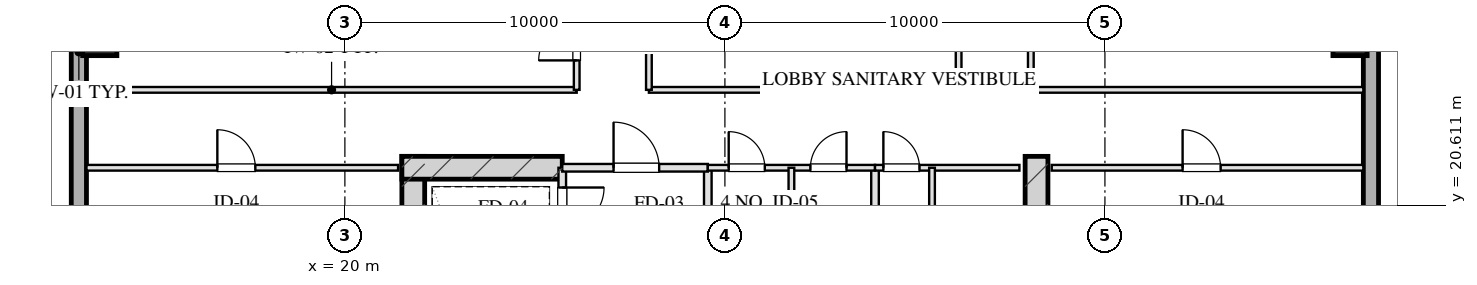
"""IFC4 building model, lengths in metres.
Left out: names, types, materials, properties, quantities, classifications, styles, units other than length and angle.
Written with IfcOpenShell. Run it as: python <this file> out.ifc"""

import sys

from ifc_helpers import new_model, si_unit, direction, frame, frame_2d, origin, origin_2d, place, context, subcontext, project, spatial, rectangle, hollow_rectangle, extrude, element, fill, save


model = new_model("IFC4")
c1 = context("Model", 3, precision=1e-05, world=origin(), true_north=direction((0.0, 1.0)))
c2 = subcontext(c1, "Body", "Model", "MODEL_VIEW")
j1 = project(units=[si_unit("LENGTHUNIT", "METRE"), si_unit("PLANEANGLEUNIT", "RADIAN")], contexts=[c1])
p1 = place(None, origin())
s1 = spatial("IfcSite", under=j1, at=p1, CompositionType="ELEMENT")
p2 = place(p1, origin())
s2 = spatial("IfcBuilding", under=s1, at=p2, CompositionType="ELEMENT")
p3 = place(p2, frame((0.0, 0.0, 177.1)))
s3 = spatial("IfcBuildingStorey", under=s2, at=p3, CompositionType="ELEMENT", Elevation=177.1)
for number, where, z_axis, x_axis in (
    (1, (21.8, 21.9, 0.0), (0.0, 0.0, 1.0), (0.0, -1.0, 0.0)),
    (2, (38.2, 21.9, 0.0), (0.0, 0.0, 1.0), (0.0, -1.0, 0.0)),
):
    element("IfcWall", number, at=place(p3, frame(where, z_axis=z_axis, x_axis=x_axis)), inside=s3, PredefinedType="SHEAR", context=c2, shape_type="SweptSolid", body=[
        extrude(rectangle(XDim=9.48, YDim=0.6, at=frame_2d((4.74, 0.0))), origin(), (0.0, 0.0, 1.0), 3.45),
    ])
p4 = place(p3, frame((21.5, 21.6, 0.0), z_axis=(0.0, 0.0, 1.0), x_axis=(1.0, 0.0, 0.0)))
e3 = element("IfcWall", 3, at=p4, inside=s3, PredefinedType="SHEAR", context=c2, shape_type="SweptSolid", body=[
    extrude(rectangle(XDim=4.22, YDim=0.6, at=frame_2d((2.11, 0.0))), origin(), (0.0, 0.0, 1.0), 3.45),
])
for number, where, z_axis, x_axis in (
    (4, (13.55, 25.0, 0.0), (0.0, 0.0, 1.0), (1.0, 0.0, 0.0)),
    (5, (46.45, 25.0, 0.0), (0.0, 0.0, 1.0), (1.0, 0.0, 0.0)),
):
    element("IfcColumn", number, at=place(p3, frame(where, z_axis=z_axis, x_axis=x_axis)), inside=s3, PredefinedType="COLUMN", context=c2, shape_type="SweptSolid", body=[
        extrude(hollow_rectangle(XDim=0.9, YDim=0.9, WallThickness=0.032, at=origin_2d()), origin(), (0.0, 0.0, 1.0), 3.451),
    ])
p5 = place(p3, frame((13.0, 10.8, 0.0), z_axis=(0.0, 0.0, 1.0), x_axis=(0.0, 1.0, 0.0)))
e6 = element("IfcWall", 6, at=p5, inside=s3, PredefinedType="SOLIDWALL", context=c2, shape_type="SweptSolid", body=[
    extrude(rectangle(XDim=46.4, YDim=0.4, at=frame_2d((23.2, 0.0))), origin(), (0.0, 0.0, 1.0), 2.61),
])
p6 = place(p5, frame((15.75, 0.0, 0.75)))
e7 = element("IfcOpeningElement", 7, at=p6, cuts=e6, PredefinedType="OPENING", context=c2, shape_type="SweptSolid", body=[
    extrude(rectangle(XDim=2.1, YDim=1.46, at=frame_2d((1.05, 0.73))), frame((0.0, 0.21, 0.0), z_axis=(0.0, -1.0, 0.0), x_axis=(1.0, 0.0, 0.0)), (0.0, 0.0, 1.0), 0.42),
])
p7 = place(p5, frame((19.55, 0.0, 0.75)))
e8 = element("IfcOpeningElement", 8, at=p7, cuts=e6, PredefinedType="OPENING", context=c2, shape_type="SweptSolid", body=[
    extrude(rectangle(XDim=2.1, YDim=1.46, at=frame_2d((1.05, 0.73))), frame((0.0, 0.21, 0.0), z_axis=(0.0, -1.0, 0.0), x_axis=(1.0, 0.0, 0.0)), (0.0, 0.0, 1.0), 0.42),
])
p8 = place(p5, frame((28.45, 0.0, 0.0)))
e9 = element("IfcOpeningElement", 9, at=p8, cuts=e6, PredefinedType="OPENING", context=c2, shape_type="SweptSolid", body=[
    extrude(rectangle(XDim=1.1, YDim=2.15, at=frame_2d((0.55, 1.075))), frame((0.0, 0.21, 0.0), z_axis=(0.0, -1.0, 0.0), x_axis=(1.0, 0.0, 0.0)), (0.0, 0.0, 1.0), 0.42),
])
p9 = place(p3, frame((47.0, 57.2, 0.0), z_axis=(0.0, 0.0, 1.0), x_axis=(0.0, -1.0, 0.0)))
e10 = element("IfcWall", 10, at=p9, inside=s3, PredefinedType="SOLIDWALL", context=c2, shape_type="SweptSolid", body=[
    extrude(rectangle(XDim=46.4, YDim=0.4, at=frame_2d((23.2, 0.0))), origin(), (0.0, 0.0, 1.0), 2.61),
])
p10 = place(p9, frame((28.55, 0.0, 0.75)))
e11 = element("IfcOpeningElement", 11, at=p10, cuts=e10, PredefinedType="OPENING", context=c2, shape_type="SweptSolid", body=[
    extrude(rectangle(XDim=2.1, YDim=1.46, at=frame_2d((1.05, 0.73))), frame((0.0, 0.21, 0.0), z_axis=(0.0, -1.0, 0.0), x_axis=(1.0, 0.0, 0.0)), (0.0, 0.0, 1.0), 0.42),
])
p11 = place(p9, frame((24.75, 0.0, 0.75)))
e12 = element("IfcOpeningElement", 12, at=p11, cuts=e10, PredefinedType="OPENING", context=c2, shape_type="SweptSolid", body=[
    extrude(rectangle(XDim=2.1, YDim=1.46, at=frame_2d((1.05, 0.73))), frame((0.0, 0.21, 0.0), z_axis=(0.0, -1.0, 0.0), x_axis=(1.0, 0.0, 0.0)), (0.0, 0.0, 1.0), 0.42),
])
p12 = place(p9, frame((18.25, 0.0, 0.0)))
e13 = element("IfcOpeningElement", 13, at=p12, cuts=e10, PredefinedType="OPENING", context=c2, shape_type="SweptSolid", body=[
    extrude(rectangle(XDim=1.1, YDim=2.15, at=frame_2d((0.55, 1.075))), frame((0.0, 0.21, 0.0), z_axis=(0.0, -1.0, 0.0), x_axis=(1.0, 0.0, 0.0)), (0.0, 0.0, 1.0), 0.42),
])
p13 = place(p3, frame((25.72, 21.6, 0.0), z_axis=(0.0, 0.0, 1.0), x_axis=(0.0, -1.0, 0.0)))
e14 = element("IfcWall", 14, at=p13, inside=s3, PredefinedType="PARTITIONING", context=c2, shape_type="SweptSolid", body=[
    extrude(rectangle(XDim=1.9, YDim=0.2, at=frame_2d((0.95, 0.0))), origin(), (0.0, 0.0, 1.0), 3.175),
])
p14 = place(p13, frame((0.52, 0.0, 0.0)))
e15 = element("IfcOpeningElement", 15, at=p14, cuts=e14, PredefinedType="OPENING", context=c2, shape_type="SweptSolid", body=[
    extrude(rectangle(XDim=1.1, YDim=2.05, at=frame_2d((0.55, 1.025))), frame((0.0, 0.11, 0.0), z_axis=(0.0, -1.0, 0.0), x_axis=(1.0, 0.0, 0.0)), (0.0, 0.0, 1.0), 0.22),
])
p15 = place(p3, frame((29.55, 21.6, 0.0), z_axis=(0.0, 0.0, 1.0), x_axis=(0.0, -1.0, 0.0)))
e16 = element("IfcWall", 16, at=p15, inside=s3, PredefinedType="PARTITIONING", context=c2, shape_type="SweptSolid", body=[
    extrude(rectangle(XDim=8.43, YDim=0.2, at=frame_2d((4.215, 0.0))), origin(), (0.0, 0.0, 1.0), 3.175),
])
p16 = place(p3, frame((25.72, 21.6, 0.0), z_axis=(0.0, 0.0, 1.0), x_axis=(1.0, 0.0, 0.0)))
e17 = element("IfcWall", 17, at=p16, inside=s3, PredefinedType="PARTITIONING", context=c2, shape_type="SweptSolid", body=[
    extrude(rectangle(XDim=3.83, YDim=0.2, at=frame_2d((1.915, 0.0))), origin(), (0.0, 0.0, 1.0), 3.175),
])
p17 = place(p16, frame((1.35, 0.0, 0.0)))
e18 = element("IfcOpeningElement", 18, at=p17, cuts=e17, PredefinedType="OPENING", context=c2, shape_type="SweptSolid", body=[
    extrude(rectangle(XDim=1.2, YDim=2.05, at=frame_2d((0.6, 1.025))), frame((0.0, 0.11, 0.0), z_axis=(0.0, -1.0, 0.0), x_axis=(1.0, 0.0, 0.0)), (0.0, 0.0, 1.0), 0.22),
])
p18 = place(p3, frame((33.95, 21.6, 0.0), z_axis=(0.0, 0.0, 1.0), x_axis=(0.0, -1.0, 0.0)))
e19 = element("IfcWall", 19, at=p18, inside=s3, PredefinedType="PARTITIONING", context=c2, shape_type="SweptSolid", body=[
    extrude(rectangle(XDim=8.43, YDim=0.2, at=frame_2d((4.215, 0.0))), origin(), (0.0, 0.0, 1.0), 3.175),
])
p19 = place(p3, frame((29.55, 21.6, 0.0), z_axis=(0.0, 0.0, 1.0), x_axis=(1.0, 0.0, 0.0)))
e20 = element("IfcWall", 20, at=p19, inside=s3, PredefinedType="PARTITIONING", context=c2, shape_type="SweptSolid", body=[
    extrude(rectangle(XDim=4.4, YDim=0.15, at=frame_2d((2.2, 0.0))), origin(), (0.0, 0.0, 1.0), 3.175),
])
p20 = place(p19, frame((0.55, 0.0, 0.0)))
e21 = element("IfcOpeningElement", 21, at=p20, cuts=e20, PredefinedType="OPENING", context=c2, shape_type="SweptSolid", body=[
    extrude(rectangle(XDim=0.95, YDim=2.05, at=frame_2d((0.475, 1.025))), frame((0.0, 0.085, 0.0), z_axis=(0.0, -1.0, 0.0), x_axis=(1.0, 0.0, 0.0)), (0.0, 0.0, 1.0), 0.17),
])
p21 = place(p19, frame((2.7, 0.0, 0.0)))
e22 = element("IfcOpeningElement", 22, at=p21, cuts=e20, PredefinedType="OPENING", context=c2, shape_type="SweptSolid", body=[
    extrude(rectangle(XDim=0.95, YDim=2.05, at=frame_2d((0.475, 1.025))), frame((0.0, 0.085, 0.0), z_axis=(0.0, -1.0, 0.0), x_axis=(1.0, 0.0, 0.0)), (0.0, 0.0, 1.0), 0.17),
])
p22 = place(p3, frame((31.75, 21.6, 0.0), z_axis=(0.0, 0.0, 1.0), x_axis=(0.0, -1.0, 0.0)))
e23 = element("IfcWall", 23, at=p22, inside=s3, PredefinedType="PARTITIONING", context=c2, shape_type="SweptSolid", body=[
    extrude(rectangle(XDim=8.43, YDim=0.15, at=frame_2d((4.215, 0.0))), origin(), (0.0, 0.0, 1.0), 3.175),
])
p23 = place(p3, frame((33.95, 21.6, 0.0), z_axis=(0.0, 0.0, 1.0), x_axis=(1.0, 0.0, 0.0)))
e24 = element("IfcWall", 24, at=p23, inside=s3, PredefinedType="PARTITIONING", context=c2, shape_type="SweptSolid", body=[
    extrude(rectangle(XDim=3.8, YDim=0.15, at=frame_2d((1.9, 0.0))), origin(), (0.0, 0.0, 1.0), 3.175),
])
p24 = place(p23, frame((0.22, 0.0, 0.0)))
e25 = element("IfcOpeningElement", 25, at=p24, cuts=e24, PredefinedType="OPENING", context=c2, shape_type="SweptSolid", body=[
    extrude(rectangle(XDim=0.95, YDim=2.05, at=frame_2d((0.475, 1.025))), frame((0.0, 0.085, 0.0), z_axis=(0.0, -1.0, 0.0), x_axis=(1.0, 0.0, 0.0)), (0.0, 0.0, 1.0), 0.17),
])
p25 = place(p3, frame((35.45, 21.6, 0.0), z_axis=(0.0, 0.0, 1.0), x_axis=(0.0, -1.0, 0.0)))
e26 = element("IfcWall", 26, at=p25, inside=s3, PredefinedType="PARTITIONING", context=c2, shape_type="SweptSolid", body=[
    extrude(rectangle(XDim=8.43, YDim=0.15, at=frame_2d((4.215, 0.0))), origin(), (0.0, 0.0, 1.0), 2.815),
])
p26 = place(p25, frame((2.55, 0.0, 0.0)))
e27 = element("IfcOpeningElement", 27, at=p26, cuts=e26, PredefinedType="OPENING", context=c2, shape_type="SweptSolid", body=[
    extrude(rectangle(XDim=0.95, YDim=2.05, at=frame_2d((0.475, 1.025))), frame((0.0, 0.085, 0.0), z_axis=(0.0, -1.0, 0.0), x_axis=(1.0, 0.0, 0.0)), (0.0, 0.0, 1.0), 0.17),
])
p27 = place(p25, frame((4.7, 0.0, 0.0)))
e28 = element("IfcOpeningElement", 28, at=p27, cuts=e26, PredefinedType="OPENING", context=c2, shape_type="SweptSolid", body=[
    extrude(rectangle(XDim=0.9, YDim=2.05, at=frame_2d((0.45, 1.025))), frame((0.0, 0.085, 0.0), z_axis=(0.0, -1.0, 0.0), x_axis=(1.0, 0.0, 0.0)), (0.0, 0.0, 1.0), 0.17),
])
p28 = place(p25, frame((6.8, 0.0, 0.0)))
e29 = element("IfcOpeningElement", 29, at=p28, cuts=e26, PredefinedType="OPENING", context=c2, shape_type="SweptSolid", body=[
    extrude(rectangle(XDim=0.9, YDim=2.05, at=frame_2d((0.45, 1.025))), frame((0.0, 0.085, 0.0), z_axis=(0.0, -1.0, 0.0), x_axis=(1.0, 0.0, 0.0)), (0.0, 0.0, 1.0), 0.17),
])
p29 = place(p3, frame((13.2, 21.6, 0.0), z_axis=(0.0, 0.0, 1.0), x_axis=(1.0, 0.0, 0.0)))
e30 = element("IfcWall", 30, at=p29, inside=s3, PredefinedType="PARTITIONING", context=c2, shape_type="SweptSolid", body=[
    extrude(rectangle(XDim=8.2, YDim=0.15, at=frame_2d((4.1, 0.0))), origin(), (0.0, 0.0, 1.0), 3.175),
])
p30 = place(p29, frame((3.444, 0.0, 0.0)))
e31 = element("IfcOpeningElement", 31, at=p30, cuts=e30, PredefinedType="OPENING", context=c2, shape_type="SweptSolid", body=[
    extrude(rectangle(XDim=1.0, YDim=2.05, at=frame_2d((0.5, 1.025))), frame((0.0, 0.085, 0.0), z_axis=(0.0, -1.0, 0.0), x_axis=(1.0, 0.0, 0.0)), (0.0, 0.0, 1.0), 0.17),
])
p31 = place(p3, frame((38.6, 21.6, 0.0), z_axis=(0.0, 0.0, 1.0), x_axis=(1.0, 0.0, 0.0)))
e32 = element("IfcWall", 32, at=p31, inside=s3, PredefinedType="PARTITIONING", context=c2, shape_type="SweptSolid", body=[
    extrude(rectangle(XDim=8.2, YDim=0.15, at=frame_2d((4.1, 0.0))), origin(), (0.0, 0.0, 1.0), 3.175),
])
p32 = place(p31, frame((3.444, 0.0, 0.0)))
e33 = element("IfcOpeningElement", 33, at=p32, cuts=e32, PredefinedType="OPENING", context=c2, shape_type="SweptSolid", body=[
    extrude(rectangle(XDim=1.0, YDim=2.05, at=frame_2d((0.5, 1.025))), frame((0.0, 0.085, 0.0), z_axis=(0.0, -1.0, 0.0), x_axis=(1.0, 0.0, 0.0)), (0.0, 0.0, 1.0), 0.17),
])
p33 = place(p3, frame((13.2, 23.65, 0.0), z_axis=(0.0, 0.0, 1.0), x_axis=(1.0, 0.0, 0.0)))
e34 = element("IfcWall", 34, at=p33, inside=s3, PredefinedType="PARTITIONING", context=c2, shape_type="SweptSolid", body=[
    extrude(rectangle(XDim=12.9, YDim=0.15, at=frame_2d((6.45, 0.0))), origin(), (0.0, 0.0, 1.0), 3.175),
])
p34 = place(p3, frame((28.0, 23.65, 0.0), z_axis=(0.0, 0.0, 1.0), x_axis=(1.0, 0.0, 0.0)))
e35 = element("IfcWall", 35, at=p34, inside=s3, PredefinedType="PARTITIONING", context=c2, shape_type="SweptSolid", body=[
    extrude(rectangle(XDim=8.15, YDim=0.15, at=frame_2d((4.075, 0.0))), origin(), (0.0, 0.0, 1.0), 3.175),
])
p35 = place(p3, frame((38.05, 23.65, 0.0), z_axis=(0.0, 0.0, 1.0), x_axis=(1.0, 0.0, 0.0)))
e36 = element("IfcWall", 36, at=p35, inside=s3, PredefinedType="PARTITIONING", context=c2, shape_type="SweptSolid", body=[
    extrude(rectangle(XDim=8.75, YDim=0.15, at=frame_2d((4.375, 0.0))), origin(), (0.0, 0.0, 1.0), 3.175),
])
p36 = place(p3, frame((26.1, 23.65, 0.0), z_axis=(0.0, 0.0, 1.0), x_axis=(0.0, 1.0, 0.0)))
e37 = element("IfcWall", 37, at=p36, inside=s3, PredefinedType="PARTITIONING", context=c2, shape_type="SweptSolid", body=[
    extrude(rectangle(XDim=20.7, YDim=0.15, at=frame_2d((10.35, 0.0))), origin(), (0.0, 0.0, 1.0), 3.175),
])
p37 = place(p36, frame((0.775, 0.0, 0.0)))
e38 = element("IfcOpeningElement", 38, at=p37, cuts=e37, PredefinedType="OPENING", context=c2, shape_type="SweptSolid", body=[
    extrude(rectangle(XDim=1.0, YDim=2.05, at=frame_2d((0.5, 1.025))), frame((0.0, 0.085, 0.0), z_axis=(0.0, -1.0, 0.0), x_axis=(1.0, 0.0, 0.0)), (0.0, 0.0, 1.0), 0.17),
])
p38 = place(p36, frame((3.95, 0.0, 0.0)))
e39 = element("IfcOpeningElement", 39, at=p38, cuts=e37, PredefinedType="OPENING", context=c2, shape_type="SweptSolid", body=[
    extrude(rectangle(XDim=1.0, YDim=2.05, at=frame_2d((0.5, 1.025))), frame((0.0, 0.085, 0.0), z_axis=(0.0, -1.0, 0.0), x_axis=(1.0, 0.0, 0.0)), (0.0, 0.0, 1.0), 0.17),
])
p39 = place(p36, frame((7.51, 0.0, 0.0)))
e40 = element("IfcOpeningElement", 40, at=p39, cuts=e37, PredefinedType="OPENING", context=c2, shape_type="SweptSolid", body=[
    extrude(rectangle(XDim=1.05, YDim=2.05, at=frame_2d((0.525, 1.025))), frame((0.0, 0.085, 0.0), z_axis=(0.0, -1.0, 0.0), x_axis=(1.0, 0.0, 0.0)), (0.0, 0.0, 1.0), 0.17),
])
p40 = place(p36, frame((11.51, 0.0, 0.0)))
e41 = element("IfcOpeningElement", 41, at=p40, cuts=e37, PredefinedType="OPENING", context=c2, shape_type="SweptSolid", body=[
    extrude(rectangle(XDim=1.0, YDim=2.05, at=frame_2d((0.5, 1.025))), frame((0.0, 0.085, 0.0), z_axis=(0.0, -1.0, 0.0), x_axis=(1.0, 0.0, 0.0)), (0.0, 0.0, 1.0), 0.17),
])
p41 = place(p36, frame((15.75, 0.0, 0.0)))
e42 = element("IfcOpeningElement", 42, at=p41, cuts=e37, PredefinedType="OPENING", context=c2, shape_type="SweptSolid", body=[
    extrude(rectangle(XDim=1.0, YDim=2.05, at=frame_2d((0.5, 1.025))), frame((0.0, 0.085, 0.0), z_axis=(0.0, -1.0, 0.0), x_axis=(1.0, 0.0, 0.0)), (0.0, 0.0, 1.0), 0.17),
])
p42 = place(p36, frame((18.925, 0.0, 0.0)))
e43 = element("IfcOpeningElement", 43, at=p42, cuts=e37, PredefinedType="OPENING", context=c2, shape_type="SweptSolid", body=[
    extrude(rectangle(XDim=0.85, YDim=2.05, at=frame_2d((0.425, 1.025))), frame((0.0, 0.085, 0.0), z_axis=(0.0, -1.0, 0.0), x_axis=(1.0, 0.0, 0.0)), (0.0, 0.0, 1.0), 0.17),
])
p43 = place(p3, frame((28.0, 23.65, 0.0), z_axis=(0.0, 0.0, 1.0), x_axis=(0.0, 1.0, 0.0)))
e44 = element("IfcWall", 44, at=p43, inside=s3, PredefinedType="PARTITIONING", context=c2, shape_type="SweptSolid", body=[
    extrude(rectangle(XDim=20.7, YDim=0.15, at=frame_2d((10.35, 0.0))), origin(), (0.0, 0.0, 1.0), 3.175),
])
p44 = place(p43, frame((2.857, 0.0, 0.0)))
e45 = element("IfcOpeningElement", 45, at=p44, cuts=e44, PredefinedType="OPENING", context=c2, shape_type="SweptSolid", body=[
    extrude(rectangle(XDim=1.1, YDim=2.05, at=frame_2d((0.55, 1.025))), frame((0.0, 0.085, 0.0), z_axis=(0.0, -1.0, 0.0), x_axis=(1.0, 0.0, 0.0)), (0.0, 0.0, 1.0), 0.17),
])
p45 = place(p43, frame((17.208, 0.0, 0.0)))
e46 = element("IfcOpeningElement", 46, at=p45, cuts=e44, PredefinedType="OPENING", context=c2, shape_type="SweptSolid", body=[
    extrude(rectangle(XDim=1.1, YDim=2.05, at=frame_2d((0.55, 1.025))), frame((0.0, 0.085, 0.0), z_axis=(0.0, -1.0, 0.0), x_axis=(1.0, 0.0, 0.0)), (0.0, 0.0, 1.0), 0.17),
])
p46 = place(p3, frame((36.15, 23.65, 0.0), z_axis=(0.0, 0.0, 1.0), x_axis=(0.0, 1.0, 0.0)))
e47 = element("IfcWall", 47, at=p46, inside=s3, PredefinedType="PARTITIONING", context=c2, shape_type="SweptSolid", body=[
    extrude(rectangle(XDim=20.7, YDim=0.15, at=frame_2d((10.35, 0.0))), origin(), (0.0, 0.0, 1.0), 3.175),
])
p47 = place(p46, frame((9.71, 0.0, 0.0)))
e48 = element("IfcOpeningElement", 48, at=p47, cuts=e47, PredefinedType="OPENING", context=c2, shape_type="SweptSolid", body=[
    extrude(rectangle(XDim=1.1, YDim=2.05, at=frame_2d((0.55, 1.025))), frame((0.0, 0.085, 0.0), z_axis=(0.0, -1.0, 0.0), x_axis=(1.0, 0.0, 0.0)), (0.0, 0.0, 1.0), 0.17),
])
p48 = place(p3, frame((38.05, 23.65, 0.0), z_axis=(0.0, 0.0, 1.0), x_axis=(0.0, 1.0, 0.0)))
e49 = element("IfcWall", 49, at=p48, inside=s3, PredefinedType="PARTITIONING", context=c2, shape_type="SweptSolid", body=[
    extrude(rectangle(XDim=20.7, YDim=0.15, at=frame_2d((10.35, 0.0))), origin(), (0.0, 0.0, 1.0), 3.175),
])
p49 = place(p48, frame((4.148, 0.0, 0.0)))
e50 = element("IfcOpeningElement", 50, at=p49, cuts=e49, PredefinedType="OPENING", context=c2, shape_type="SweptSolid", body=[
    extrude(rectangle(XDim=1.05, YDim=2.05, at=frame_2d((0.525, 1.025))), frame((0.0, 0.085, 0.0), z_axis=(0.0, -1.0, 0.0), x_axis=(1.0, 0.0, 0.0)), (0.0, 0.0, 1.0), 0.17),
])
p50 = place(p48, frame((14.499, 0.0, 0.0)))
e51 = element("IfcOpeningElement", 51, at=p50, cuts=e49, PredefinedType="OPENING", context=c2, shape_type="SweptSolid", body=[
    extrude(rectangle(XDim=1.0, YDim=2.05, at=frame_2d((0.5, 1.025))), frame((0.0, 0.085, 0.0), z_axis=(0.0, -1.0, 0.0), x_axis=(1.0, 0.0, 0.0)), (0.0, 0.0, 1.0), 0.17),
])
p51 = place(p14, origin())
e52 = element("IfcDoor", 52, at=p51, inside=s3, OperationType="SINGLE_SWING_LEFT", PredefinedType="DOOR", context=c2, shape_type="SweptSolid", body=[
    extrude(rectangle(XDim=1.1, YDim=2.05, at=frame_2d((0.55, 1.025))), frame((0.0, 0.025, 0.0), z_axis=(0.0, -1.0, 0.0), x_axis=(1.0, 0.0, 0.0)), (0.0, 0.0, 1.0), 0.05),
])
fill(e15, e52)
p52 = place(p17, origin())
e53 = element("IfcDoor", 53, at=p52, inside=s3, OperationType="SINGLE_SWING_LEFT", PredefinedType="DOOR", context=c2, shape_type="SweptSolid", body=[
    extrude(rectangle(XDim=1.2, YDim=2.05, at=frame_2d((0.6, 1.025))), frame((0.0, 0.025, 0.0), z_axis=(0.0, -1.0, 0.0), x_axis=(1.0, 0.0, 0.0)), (0.0, 0.0, 1.0), 0.05),
])
fill(e18, e53)
p53 = place(p20, origin())
e54 = element("IfcDoor", 54, at=p53, inside=s3, OperationType="SINGLE_SWING_LEFT", PredefinedType="DOOR", context=c2, shape_type="SweptSolid", body=[
    extrude(rectangle(XDim=0.95, YDim=2.05, at=frame_2d((0.475, 1.025))), frame((0.0, 0.025, 0.0), z_axis=(0.0, -1.0, 0.0), x_axis=(1.0, 0.0, 0.0)), (0.0, 0.0, 1.0), 0.05),
])
fill(e21, e54)
p54 = place(p21, origin())
e55 = element("IfcDoor", 55, at=p54, inside=s3, OperationType="SINGLE_SWING_RIGHT", PredefinedType="DOOR", context=c2, shape_type="SweptSolid", body=[
    extrude(rectangle(XDim=0.95, YDim=2.05, at=frame_2d((0.475, 1.025))), frame((0.0, 0.025, 0.0), z_axis=(0.0, -1.0, 0.0), x_axis=(1.0, 0.0, 0.0)), (0.0, 0.0, 1.0), 0.05),
])
fill(e22, e55)
p55 = place(p24, origin())
e56 = element("IfcDoor", 56, at=p55, inside=s3, OperationType="SINGLE_SWING_LEFT", PredefinedType="DOOR", context=c2, shape_type="SweptSolid", body=[
    extrude(rectangle(XDim=0.95, YDim=2.05, at=frame_2d((0.475, 1.025))), frame((0.0, 0.025, 0.0), z_axis=(0.0, -1.0, 0.0), x_axis=(1.0, 0.0, 0.0)), (0.0, 0.0, 1.0), 0.05),
])
fill(e25, e56)
p56 = place(p30, origin())
e57 = element("IfcDoor", 57, at=p56, inside=s3, OperationType="SINGLE_SWING_LEFT", PredefinedType="DOOR", context=c2, shape_type="SweptSolid", body=[
    extrude(rectangle(XDim=1.0, YDim=2.05, at=frame_2d((0.5, 1.025))), frame((0.0, 0.025, 0.0), z_axis=(0.0, -1.0, 0.0), x_axis=(1.0, 0.0, 0.0)), (0.0, 0.0, 1.0), 0.05),
])
fill(e31, e57)
p57 = place(p32, origin())
e58 = element("IfcDoor", 58, at=p57, inside=s3, OperationType="SINGLE_SWING_LEFT", PredefinedType="DOOR", context=c2, shape_type="SweptSolid", body=[
    extrude(rectangle(XDim=1.0, YDim=2.05, at=frame_2d((0.5, 1.025))), frame((0.0, 0.025, 0.0), z_axis=(0.0, -1.0, 0.0), x_axis=(1.0, 0.0, 0.0)), (0.0, 0.0, 1.0), 0.05),
])
fill(e33, e58)
p58 = place(p37, origin())
e59 = element("IfcDoor", 59, at=p58, inside=s3, OperationType="SINGLE_SWING_LEFT", PredefinedType="DOOR", context=c2, shape_type="SweptSolid", body=[
    extrude(rectangle(XDim=1.0, YDim=2.05, at=frame_2d((0.5, 1.025))), frame((0.0, 0.025, 0.0), z_axis=(0.0, -1.0, 0.0), x_axis=(1.0, 0.0, 0.0)), (0.0, 0.0, 1.0), 0.05),
])
fill(e38, e59)
save(model, sys.argv[1])
